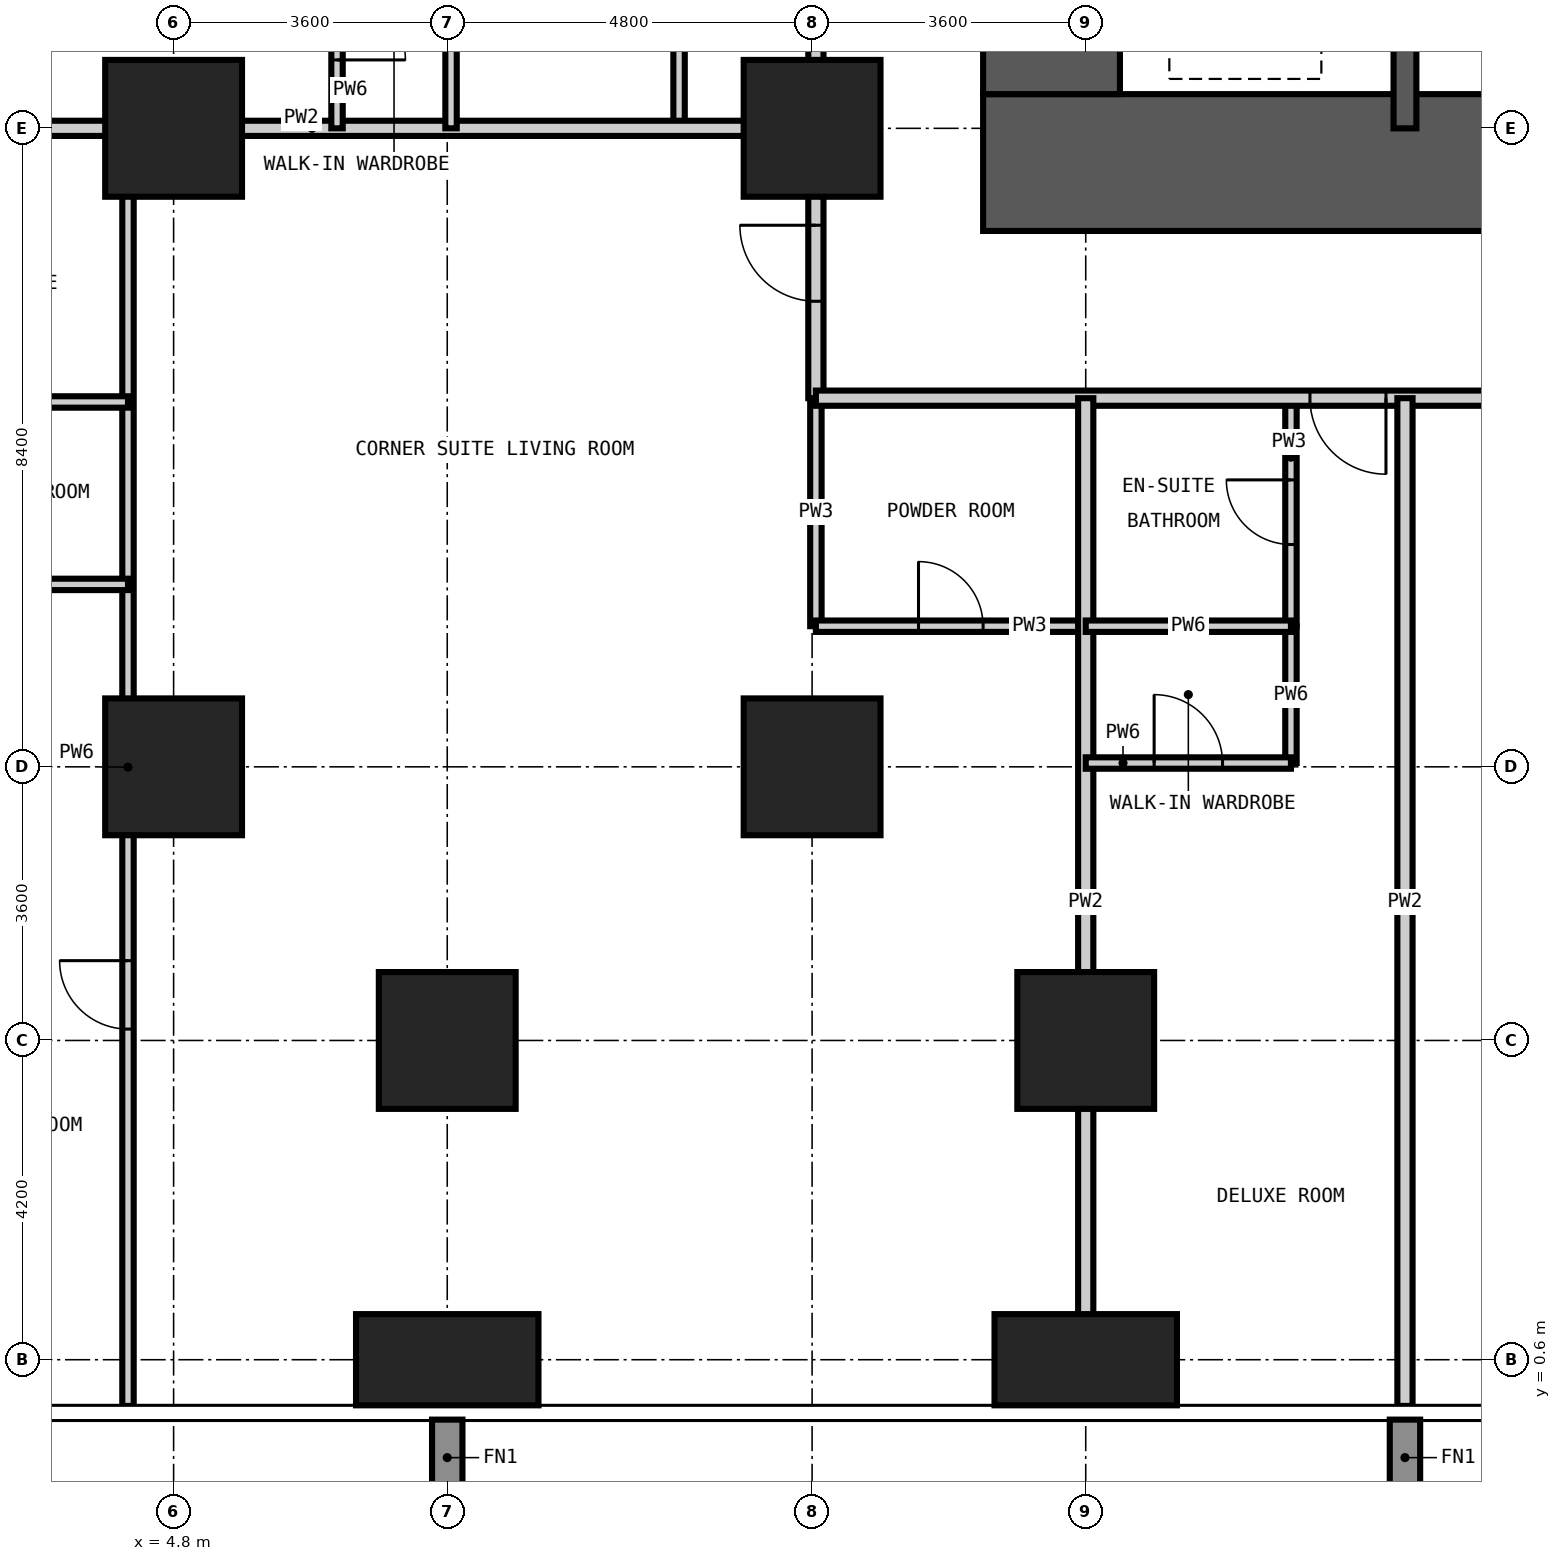
"""IFC4 building model, lengths in metres.
Left out: names, types, materials, properties, quantities, classifications, styles, units other than length and angle.
Written with IfcOpenShell. Run it as: python <this file> out.ifc"""

import sys

from ifc_helpers import new_model, si_unit, direction, frame, frame_2d, origin, origin_2d, place, context, subcontext, project, spatial, rectangle, extrude, element, fill, save


model = new_model("IFC4")
c1 = context("Model", 3, precision=1e-05, world=origin(), true_north=direction((0.0, 1.0)))
c2 = subcontext(c1, "Body", "Model", "MODEL_VIEW")
j1 = project(units=[si_unit("LENGTHUNIT", "METRE"), si_unit("PLANEANGLEUNIT", "RADIAN")], contexts=[c1])
p1 = place(None, origin())
s1 = spatial("IfcSite", under=j1, at=p1, CompositionType="ELEMENT")
p2 = place(p1, origin())
s2 = spatial("IfcBuilding", under=s1, at=p2, CompositionType="ELEMENT")
p3 = place(p2, frame((0.0, 0.0, 34.2)))
s3 = spatial("IfcBuildingStorey", under=s2, at=p3, CompositionType="ELEMENT", Elevation=34.2)
for number, where, z_axis, x_axis in (
    (1, (4.8, 8.4, -0.35), (0.0, 0.0, 1.0), (1.0, 0.0, 0.0)),
    (2, (4.8, 16.8, -0.35), (0.0, 0.0, 1.0), (1.0, 0.0, 0.0)),
):
    element("IfcColumn", number, at=place(p3, frame(where, z_axis=z_axis, x_axis=x_axis)), inside=s3, PredefinedType="COLUMN", context=c2, shape_type="SweptSolid", body=[
        extrude(rectangle(XDim=1.8, YDim=1.8, at=origin_2d()), origin(), (0.0, 0.0, 1.0), 3.6),
    ])
p4 = place(p3, frame((8.4, 0.6, -0.35), z_axis=(0.0, 0.0, 1.0), x_axis=(1.0, 0.0, 0.0)))
e3 = element("IfcColumn", 3, at=p4, inside=s3, PredefinedType="COLUMN", context=c2, shape_type="SweptSolid", body=[
    extrude(rectangle(XDim=2.4, YDim=1.2, at=origin_2d()), origin(), (0.0, 0.0, 1.0), 3.6),
])
for number, where, z_axis, x_axis in (
    (4, (8.4, 4.8, -0.35), (0.0, 0.0, 1.0), (1.0, 0.0, 0.0)),
    (5, (13.2, 8.4, -0.35), (0.0, 0.0, 1.0), (1.0, 0.0, 0.0)),
    (6, (13.2, 16.8, -0.35), (0.0, 0.0, 1.0), (1.0, 0.0, 0.0)),
):
    element("IfcColumn", number, at=place(p3, frame(where, z_axis=z_axis, x_axis=x_axis)), inside=s3, PredefinedType="COLUMN", context=c2, shape_type="SweptSolid", body=[
        extrude(rectangle(XDim=1.8, YDim=1.8, at=origin_2d()), origin(), (0.0, 0.0, 1.0), 3.6),
    ])
p5 = place(p3, frame((16.8, 0.6, -0.35), z_axis=(0.0, 0.0, 1.0), x_axis=(1.0, 0.0, 0.0)))
e7 = element("IfcColumn", 7, at=p5, inside=s3, PredefinedType="COLUMN", context=c2, shape_type="SweptSolid", body=[
    extrude(rectangle(XDim=2.4, YDim=1.2, at=origin_2d()), origin(), (0.0, 0.0, 1.0), 3.6),
])
p6 = place(p3, frame((16.8, 4.8, -0.35), z_axis=(0.0, 0.0, 1.0), x_axis=(1.0, 0.0, 0.0)))
e8 = element("IfcColumn", 8, at=p6, inside=s3, PredefinedType="COLUMN", context=c2, shape_type="SweptSolid", body=[
    extrude(rectangle(XDim=1.8, YDim=1.8, at=origin_2d()), origin(), (0.0, 0.0, 1.0), 3.6),
])
p7 = place(p3, frame((15.45, 16.35, -0.35), z_axis=(0.0, 0.0, 1.0), x_axis=(1.0, 0.0, 0.0)))
e9 = element("IfcWall", 9, at=p7, inside=s3, PredefinedType="SHEAR", context=c2, shape_type="SweptSolid", body=[
    extrude(rectangle(XDim=27.9, YDim=1.8, at=frame_2d((13.95, 0.0))), origin(), (0.0, 0.0, 1.0), 3.6),
])
p8 = place(p7, frame((13.45, 0.0, 0.35)))
e10 = element("IfcOpeningElement", 10, at=p8, cuts=e9, PredefinedType="OPENING", context=c2, shape_type="SweptSolid", body=[
    extrude(rectangle(XDim=1.0, YDim=2.1, at=frame_2d((0.5, 1.05))), frame((0.0, 0.91, 0.0), z_axis=(0.0, -1.0, 0.0), x_axis=(1.0, 0.0, 0.0)), (0.0, 0.0, 1.0), 1.82),
])
p9 = place(p7, frame((19.75, 0.0, 0.35)))
e11 = element("IfcOpeningElement", 11, at=p9, cuts=e9, PredefinedType="OPENING", context=c2, shape_type="SweptSolid", body=[
    extrude(rectangle(XDim=1.0, YDim=2.1, at=frame_2d((0.5, 1.05))), frame((0.0, 0.91, 0.0), z_axis=(0.0, -1.0, 0.0), x_axis=(1.0, 0.0, 0.0)), (0.0, 0.0, 1.0), 1.82),
])
p10 = place(p3, frame((16.35, 41.55, -0.35), z_axis=(0.0, 0.0, 1.0), x_axis=(0.0, -1.0, 0.0)))
e12 = element("IfcWall", 12, at=p10, inside=s3, PredefinedType="SHEAR", context=c2, shape_type="SweptSolid", body=[
    extrude(rectangle(XDim=24.3, YDim=1.8, at=frame_2d((12.15, 0.0))), origin(), (0.0, 0.0, 1.0), 3.6),
])
p11 = place(p10, frame((11.25, 0.0, 0.35)))
e13 = element("IfcOpeningElement", 13, at=p11, cuts=e12, PredefinedType="OPENING", context=c2, shape_type="SweptSolid", body=[
    extrude(rectangle(XDim=1.8, YDim=2.2, at=frame_2d((0.9, 1.1))), frame((0.0, 0.91, 0.0), z_axis=(0.0, -1.0, 0.0), x_axis=(1.0, 0.0, 0.0)), (0.0, 0.0, 1.0), 1.82),
])
p12 = place(p10, frame((20.05, 0.0, 0.35)))
e14 = element("IfcOpeningElement", 14, at=p12, cuts=e12, PredefinedType="OPENING", context=c2, shape_type="SweptSolid", body=[
    extrude(rectangle(XDim=1.0, YDim=2.1, at=frame_2d((0.5, 1.05))), frame((0.0, 0.91, 0.0), z_axis=(0.0, -1.0, 0.0), x_axis=(1.0, 0.0, 0.0)), (0.0, 0.0, 1.0), 1.82),
])
p13 = place(p10, frame((5.35, 0.0, 0.35)))
e15 = element("IfcOpeningElement", 15, at=p13, cuts=e12, PredefinedType="OPENING", context=c2, shape_type="SweptSolid", body=[
    extrude(rectangle(XDim=1.0, YDim=2.1, at=frame_2d((0.5, 1.05))), frame((0.0, 0.91, 0.0), z_axis=(0.0, -1.0, 0.0), x_axis=(1.0, 0.0, 0.0)), (0.0, 0.0, 1.0), 1.82),
])
p14 = place(p3, frame((21.0, 16.8, -0.35), z_axis=(0.0, 0.0, 1.0), x_axis=(0.0, 1.0, 0.0)))
e16 = element("IfcWall", 16, at=p14, inside=s3, PredefinedType="SHEAR", context=c2, shape_type="SweptSolid", body=[
    extrude(rectangle(XDim=2.8, YDim=0.3, at=frame_2d((1.4, 0.0))), origin(), (0.0, 0.0, 1.0), 3.6),
])
p15 = place(p3, frame((11.45, 16.8, 0.0), z_axis=(0.0, 0.0, 1.0), x_axis=(0.0, 1.0, 0.0)))
e17 = element("IfcWall", 17, at=p15, inside=s3, PredefinedType="PARTITIONING", context=c2, shape_type="SweptSolid", body=[
    extrude(rectangle(XDim=2.7, YDim=0.15, at=frame_2d((1.35, 0.0))), origin(), (0.0, 0.0, 1.0), 3.25),
])
p16 = place(p3, frame((13.25, 10.25, 0.0), z_axis=(0.0, 0.0, 1.0), x_axis=(0.0, 1.0, 0.0)))
e18 = element("IfcWall", 18, at=p16, inside=s3, PredefinedType="PARTITIONING", context=c2, shape_type="SweptSolid", body=[
    extrude(rectangle(XDim=3.0, YDim=0.15, at=frame_2d((1.5, 0.0))), origin(), (0.0, 0.0, 1.0), 3.25),
])
p17 = place(p3, frame((19.5, 10.25, 0.0), z_axis=(0.0, 0.0, 1.0), x_axis=(0.0, 1.0, 0.0)))
e19 = element("IfcWall", 19, at=p17, inside=s3, PredefinedType="PARTITIONING", context=c2, shape_type="SweptSolid", body=[
    extrude(rectangle(XDim=3.0, YDim=0.15, at=frame_2d((1.5, 0.0))), origin(), (0.0, 0.0, 1.0), 3.25),
])
p18 = place(p17, frame((1.075, 0.0, 0.0)))
e20 = element("IfcOpeningElement", 20, at=p18, cuts=e19, PredefinedType="OPENING", context=c2, shape_type="SweptSolid", body=[
    extrude(rectangle(XDim=0.85, YDim=2.1, at=frame_2d((0.425, 1.05))), frame((0.0, 0.085, 0.0), z_axis=(0.0, -1.0, 0.0), x_axis=(1.0, 0.0, 0.0)), (0.0, 0.0, 1.0), 0.17),
])
p19 = place(p3, frame((13.25, 10.25, 0.0), z_axis=(0.0, 0.0, 1.0), x_axis=(1.0, 0.0, 0.0)))
e21 = element("IfcWall", 21, at=p19, inside=s3, PredefinedType="PARTITIONING", context=c2, shape_type="SweptSolid", body=[
    extrude(rectangle(XDim=3.55, YDim=0.15, at=frame_2d((1.775, 0.0))), origin(), (0.0, 0.0, 1.0), 3.25),
])
p20 = place(p19, frame((1.35, 0.0, 0.0)))
e22 = element("IfcOpeningElement", 22, at=p20, cuts=e21, PredefinedType="OPENING", context=c2, shape_type="SweptSolid", body=[
    extrude(rectangle(XDim=0.85, YDim=2.1, at=frame_2d((0.425, 1.05))), frame((0.0, 0.085, 0.0), z_axis=(0.0, -1.0, 0.0), x_axis=(1.0, 0.0, 0.0)), (0.0, 0.0, 1.0), 0.17),
])
p21 = place(p3, frame((13.25, 13.25, 0.0), z_axis=(0.0, 0.0, 1.0), x_axis=(0.0, 1.0, 0.0)))
e23 = element("IfcWall", 23, at=p21, inside=s3, PredefinedType="PARTITIONING", context=c2, shape_type="SweptSolid", body=[
    extrude(rectangle(XDim=32.0, YDim=0.2, at=frame_2d((16.0, 0.0))), origin(), (0.0, 0.0, 1.0), 3.25),
])
p22 = place(p21, frame((9.35, 0.0, 0.0)))
e24 = element("IfcOpeningElement", 24, at=p22, cuts=e23, PredefinedType="OPENING", context=c2, shape_type="SweptSolid", body=[
    extrude(rectangle(XDim=1.0, YDim=2.2, at=frame_2d((0.5, 1.1))), frame((0.0, 0.11, 0.0), z_axis=(0.0, -1.0, 0.0), x_axis=(1.0, 0.0, 0.0)), (0.0, 0.0, 1.0), 0.22),
])
p23 = place(p21, frame((16.4, 0.0, 0.0)))
e25 = element("IfcOpeningElement", 25, at=p23, cuts=e23, PredefinedType="OPENING", context=c2, shape_type="SweptSolid", body=[
    extrude(rectangle(XDim=1.0, YDim=2.2, at=frame_2d((0.5, 1.1))), frame((0.0, 0.11, 0.0), z_axis=(0.0, -1.0, 0.0), x_axis=(1.0, 0.0, 0.0)), (0.0, 0.0, 1.0), 0.22),
])
p24 = place(p21, frame((23.3, 0.0, 0.0)))
e26 = element("IfcOpeningElement", 26, at=p24, cuts=e23, PredefinedType="OPENING", context=c2, shape_type="SweptSolid", body=[
    extrude(rectangle(XDim=1.0, YDim=2.2, at=frame_2d((0.5, 1.1))), frame((0.0, 0.11, 0.0), z_axis=(0.0, -1.0, 0.0), x_axis=(1.0, 0.0, 0.0)), (0.0, 0.0, 1.0), 0.22),
])
p25 = place(p21, frame((24.8, 0.0, 0.0)))
e27 = element("IfcOpeningElement", 27, at=p25, cuts=e23, PredefinedType="OPENING", context=c2, shape_type="SweptSolid", body=[
    extrude(rectangle(XDim=1.0, YDim=2.2, at=frame_2d((0.5, 1.1))), frame((0.0, 0.11, 0.0), z_axis=(0.0, -1.0, 0.0), x_axis=(1.0, 0.0, 0.0)), (0.0, 0.0, 1.0), 0.22),
])
p26 = place(p21, frame((1.275, 0.0, 0.0)))
e28 = element("IfcOpeningElement", 28, at=p26, cuts=e23, PredefinedType="OPENING", context=c2, shape_type="SweptSolid", body=[
    extrude(rectangle(XDim=1.0, YDim=2.2, at=frame_2d((0.5, 1.1))), frame((0.0, 0.11, 0.0), z_axis=(0.0, -1.0, 0.0), x_axis=(1.0, 0.0, 0.0)), (0.0, 0.0, 1.0), 0.22),
])
p27 = place(p21, frame((29.875, 0.0, 0.0)))
e29 = element("IfcOpeningElement", 29, at=p27, cuts=e23, PredefinedType="OPENING", context=c2, shape_type="SweptSolid", body=[
    extrude(rectangle(XDim=1.0, YDim=2.2, at=frame_2d((0.5, 1.1))), frame((0.0, 0.11, 0.0), z_axis=(0.0, -1.0, 0.0), x_axis=(1.0, 0.0, 0.0)), (0.0, 0.0, 1.0), 0.22),
])
p28 = place(p3, frame((45.85, 13.25, 0.0), z_axis=(0.0, 0.0, 1.0), x_axis=(-1.0, 0.0, 0.0)))
e30 = element("IfcWall", 30, at=p28, inside=s3, PredefinedType="PARTITIONING", context=c2, shape_type="SweptSolid", body=[
    extrude(rectangle(XDim=32.6, YDim=0.2, at=frame_2d((16.3, 0.0))), origin(), (0.0, 0.0, 1.0), 3.25),
])
p29 = place(p28, frame((25.1, 0.0, 0.0)))
e31 = element("IfcOpeningElement", 31, at=p29, cuts=e30, PredefinedType="OPENING", context=c2, shape_type="SweptSolid", body=[
    extrude(rectangle(XDim=1.0, YDim=2.2, at=frame_2d((0.5, 1.1))), frame((0.0, 0.11, 0.0), z_axis=(0.0, -1.0, 0.0), x_axis=(1.0, 0.0, 0.0)), (0.0, 0.0, 1.0), 0.22),
])
p30 = place(p28, frame((21.65, 0.0, 0.0)))
e32 = element("IfcOpeningElement", 32, at=p30, cuts=e30, PredefinedType="OPENING", context=c2, shape_type="SweptSolid", body=[
    extrude(rectangle(XDim=1.0, YDim=2.2, at=frame_2d((0.5, 1.1))), frame((0.0, 0.11, 0.0), z_axis=(0.0, -1.0, 0.0), x_axis=(1.0, 0.0, 0.0)), (0.0, 0.0, 1.0), 0.22),
])
p31 = place(p28, frame((11.75, 0.0, 0.0)))
e33 = element("IfcOpeningElement", 33, at=p31, cuts=e30, PredefinedType="OPENING", context=c2, shape_type="SweptSolid", body=[
    extrude(rectangle(XDim=1.0, YDim=2.2, at=frame_2d((0.5, 1.1))), frame((0.0, 0.11, 0.0), z_axis=(0.0, -1.0, 0.0), x_axis=(1.0, 0.0, 0.0)), (0.0, 0.0, 1.0), 0.22),
])
p32 = place(p28, frame((6.8, 0.0, 0.0)))
e34 = element("IfcOpeningElement", 34, at=p32, cuts=e30, PredefinedType="OPENING", context=c2, shape_type="SweptSolid", body=[
    extrude(rectangle(XDim=1.0, YDim=2.2, at=frame_2d((0.5, 1.1))), frame((0.0, 0.11, 0.0), z_axis=(0.0, -1.0, 0.0), x_axis=(1.0, 0.0, 0.0)), (0.0, 0.0, 1.0), 0.22),
])
for number, where, z_axis, x_axis in (
    (35, (16.8, -0.008, 0.0), (0.0, 0.0, 1.0), (0.0, 1.0, 0.0)),
    (36, (21.0, -0.008, 0.0), (0.0, 0.0, 1.0), (0.0, 1.0, 0.0)),
    (37, (-0.008, 16.8, 0.0), (0.0, 0.0, 1.0), (1.0, 0.0, 0.0)),
):
    element("IfcWall", number, at=place(p3, frame(where, z_axis=z_axis, x_axis=x_axis)), inside=s3, PredefinedType="PARTITIONING", context=c2, shape_type="SweptSolid", body=[
        extrude(rectangle(XDim=13.258, YDim=0.2, at=frame_2d((6.629, 0.0))), origin(), (0.0, 0.0, 1.0), 3.25),
    ])
p33 = place(p3, frame((4.2, -0.008, 0.0), z_axis=(0.0, 0.0, 1.0), x_axis=(0.0, 1.0, 0.0)))
e38 = element("IfcWall", 38, at=p33, inside=s3, PredefinedType="PARTITIONING", context=c2, shape_type="SweptSolid", body=[
    extrude(rectangle(XDim=16.808, YDim=0.15, at=frame_2d((8.404, 0.0))), origin(), (0.0, 0.0, 1.0), 3.25),
])
p34 = place(p33, frame((4.958, 0.0, 0.0)))
e39 = element("IfcOpeningElement", 39, at=p34, cuts=e38, PredefinedType="OPENING", context=c2, shape_type="SweptSolid", body=[
    extrude(rectangle(XDim=0.9, YDim=2.1, at=frame_2d((0.45, 1.05))), frame((0.0, 0.085, 0.0), z_axis=(0.0, -1.0, 0.0), x_axis=(1.0, 0.0, 0.0)), (0.0, 0.0, 1.0), 0.17),
])
p35 = place(p3, frame((6.95, 16.8, 0.0), z_axis=(0.0, 0.0, 1.0), x_axis=(0.0, 1.0, 0.0)))
e40 = element("IfcWall", 40, at=p35, inside=s3, PredefinedType="PARTITIONING", context=c2, shape_type="SweptSolid", body=[
    extrude(rectangle(XDim=2.7, YDim=0.15, at=frame_2d((1.35, 0.0))), origin(), (0.0, 0.0, 1.0), 3.25),
])
p36 = place(p35, frame((0.9, 0.0, 0.0)))
e41 = element("IfcOpeningElement", 41, at=p36, cuts=e40, PredefinedType="OPENING", context=c2, shape_type="SweptSolid", body=[
    extrude(rectangle(XDim=0.9, YDim=2.1, at=frame_2d((0.45, 1.05))), frame((0.0, 0.085, 0.0), z_axis=(0.0, -1.0, 0.0), x_axis=(1.0, 0.0, 0.0)), (0.0, 0.0, 1.0), 0.17),
])
p37 = place(p3, frame((8.45, 16.8, 0.0), z_axis=(0.0, 0.0, 1.0), x_axis=(0.0, 1.0, 0.0)))
e42 = element("IfcWall", 42, at=p37, inside=s3, PredefinedType="PARTITIONING", context=c2, shape_type="SweptSolid", body=[
    extrude(rectangle(XDim=2.7, YDim=0.15, at=frame_2d((1.35, 0.0))), origin(), (0.0, 0.0, 1.0), 3.25),
])
p38 = place(p3, frame((19.5, 8.45, 0.0), z_axis=(0.0, 0.0, 1.0), x_axis=(0.0, 1.0, 0.0)))
e43 = element("IfcWall", 43, at=p38, inside=s3, PredefinedType="PARTITIONING", context=c2, shape_type="SweptSolid", body=[
    extrude(rectangle(XDim=1.8, YDim=0.15, at=frame_2d((0.9, 0.0))), origin(), (0.0, 0.0, 1.0), 3.25),
])
p39 = place(p3, frame((16.8, 8.45, 0.0), z_axis=(0.0, 0.0, 1.0), x_axis=(1.0, 0.0, 0.0)))
e44 = element("IfcWall", 44, at=p39, inside=s3, PredefinedType="PARTITIONING", context=c2, shape_type="SweptSolid", body=[
    extrude(rectangle(XDim=2.7, YDim=0.15, at=frame_2d((1.35, 0.0))), origin(), (0.0, 0.0, 1.0), 3.25),
])
p40 = place(p39, frame((0.9, 0.0, 0.0)))
e45 = element("IfcOpeningElement", 45, at=p40, cuts=e44, PredefinedType="OPENING", context=c2, shape_type="SweptSolid", body=[
    extrude(rectangle(XDim=0.9, YDim=2.1, at=frame_2d((0.45, 1.05))), frame((0.0, 0.085, 0.0), z_axis=(0.0, -1.0, 0.0), x_axis=(1.0, 0.0, 0.0)), (0.0, 0.0, 1.0), 0.17),
])
p41 = place(p3, frame((16.8, 10.25, 0.0), z_axis=(0.0, 0.0, 1.0), x_axis=(1.0, 0.0, 0.0)))
e46 = element("IfcWall", 46, at=p41, inside=s3, PredefinedType="PARTITIONING", context=c2, shape_type="SweptSolid", body=[
    extrude(rectangle(XDim=2.7, YDim=0.15, at=frame_2d((1.35, 0.0))), origin(), (0.0, 0.0, 1.0), 3.25),
])
p42 = place(p3, frame((1.2, 10.8, 0.0), z_axis=(0.0, 0.0, 1.0), x_axis=(1.0, 0.0, 0.0)))
e47 = element("IfcWall", 47, at=p42, inside=s3, PredefinedType="PARTITIONING", context=c2, shape_type="SweptSolid", body=[
    extrude(rectangle(XDim=3.0, YDim=0.15, at=frame_2d((1.5, 0.0))), origin(), (0.0, 0.0, 1.0), 3.25),
])
p43 = place(p42, frame((1.05, 0.0, 0.0)))
e48 = element("IfcOpeningElement", 48, at=p43, cuts=e47, PredefinedType="OPENING", context=c2, shape_type="SweptSolid", body=[
    extrude(rectangle(XDim=0.9, YDim=2.1, at=frame_2d((0.45, 1.05))), frame((0.0, 0.085, 0.0), z_axis=(0.0, -1.0, 0.0), x_axis=(1.0, 0.0, 0.0)), (0.0, 0.0, 1.0), 0.17),
])
p44 = place(p3, frame((1.2, 13.2, 0.0), z_axis=(0.0, 0.0, 1.0), x_axis=(1.0, 0.0, 0.0)))
e49 = element("IfcWall", 49, at=p44, inside=s3, PredefinedType="PARTITIONING", context=c2, shape_type="SweptSolid", body=[
    extrude(rectangle(XDim=3.0, YDim=0.15, at=frame_2d((1.5, 0.0))), origin(), (0.0, 0.0, 1.0), 3.25),
])
p45 = place(p29, origin())
e50 = element("IfcDoor", 50, at=p45, inside=s3, OperationType="SINGLE_SWING_LEFT", PredefinedType="DOOR", context=c2, shape_type="SweptSolid", body=[
    extrude(rectangle(XDim=1.0, YDim=2.2, at=frame_2d((0.5, 1.1))), frame((0.0, 0.025, 0.0), z_axis=(0.0, -1.0, 0.0), x_axis=(1.0, 0.0, 0.0)), (0.0, 0.0, 1.0), 0.05),
])
fill(e31, e50)
p46 = place(p18, origin())
e51 = element("IfcDoor", 51, at=p46, inside=s3, OperationType="SINGLE_SWING_RIGHT", PredefinedType="DOOR", context=c2, shape_type="SweptSolid", body=[
    extrude(rectangle(XDim=0.85, YDim=2.1, at=frame_2d((0.425, 1.05))), frame((0.0, 0.025, 0.0), z_axis=(0.0, -1.0, 0.0), x_axis=(1.0, 0.0, 0.0)), (0.0, 0.0, 1.0), 0.05),
])
fill(e20, e51)
p47 = place(p40, origin())
e52 = element("IfcDoor", 52, at=p47, inside=s3, OperationType="SINGLE_SWING_LEFT", PredefinedType="DOOR", context=c2, shape_type="SweptSolid", body=[
    extrude(rectangle(XDim=0.9, YDim=2.1, at=frame_2d((0.45, 1.05))), frame((0.0, 0.025, 0.0), z_axis=(0.0, -1.0, 0.0), x_axis=(1.0, 0.0, 0.0)), (0.0, 0.0, 1.0), 0.05),
])
fill(e45, e52)
p48 = place(p36, frame((0.9, 0.0, 0.0), z_axis=(0.0, 0.0, 1.0), x_axis=(-1.0, 0.0, 0.0)))
e53 = element("IfcDoor", 53, at=p48, inside=s3, OperationType="SINGLE_SWING_RIGHT", PredefinedType="DOOR", context=c2, shape_type="SweptSolid", body=[
    extrude(rectangle(XDim=0.9, YDim=2.1, at=frame_2d((0.45, 1.05))), frame((0.0, 0.025, 0.0), z_axis=(0.0, -1.0, 0.0), x_axis=(1.0, 0.0, 0.0)), (0.0, 0.0, 1.0), 0.05),
])
fill(e41, e53)
p49 = place(p26, origin())
e54 = element("IfcDoor", 54, at=p49, inside=s3, OperationType="SINGLE_SWING_RIGHT", PredefinedType="DOOR", context=c2, shape_type="SweptSolid", body=[
    extrude(rectangle(XDim=1.0, YDim=2.2, at=frame_2d((0.5, 1.1))), frame((0.0, 0.025, 0.0), z_axis=(0.0, -1.0, 0.0), x_axis=(1.0, 0.0, 0.0)), (0.0, 0.0, 1.0), 0.05),
])
fill(e28, e54)
p50 = place(p20, origin())
e55 = element("IfcDoor", 55, at=p50, inside=s3, OperationType="SINGLE_SWING_LEFT", PredefinedType="DOOR", context=c2, shape_type="SweptSolid", body=[
    extrude(rectangle(XDim=0.85, YDim=2.1, at=frame_2d((0.425, 1.05))), frame((0.0, 0.025, 0.0), z_axis=(0.0, -1.0, 0.0), x_axis=(1.0, 0.0, 0.0)), (0.0, 0.0, 1.0), 0.05),
])
fill(e22, e55)
p51 = place(p34, origin())
e56 = element("IfcDoor", 56, at=p51, inside=s3, OperationType="SINGLE_SWING_RIGHT", PredefinedType="DOOR", context=c2, shape_type="SweptSolid", body=[
    extrude(rectangle(XDim=0.9, YDim=2.1, at=frame_2d((0.45, 1.05))), frame((0.0, 0.025, 0.0), z_axis=(0.0, -1.0, 0.0), x_axis=(1.0, 0.0, 0.0)), (0.0, 0.0, 1.0), 0.05),
])
fill(e39, e56)
save(model, sys.argv[1])
